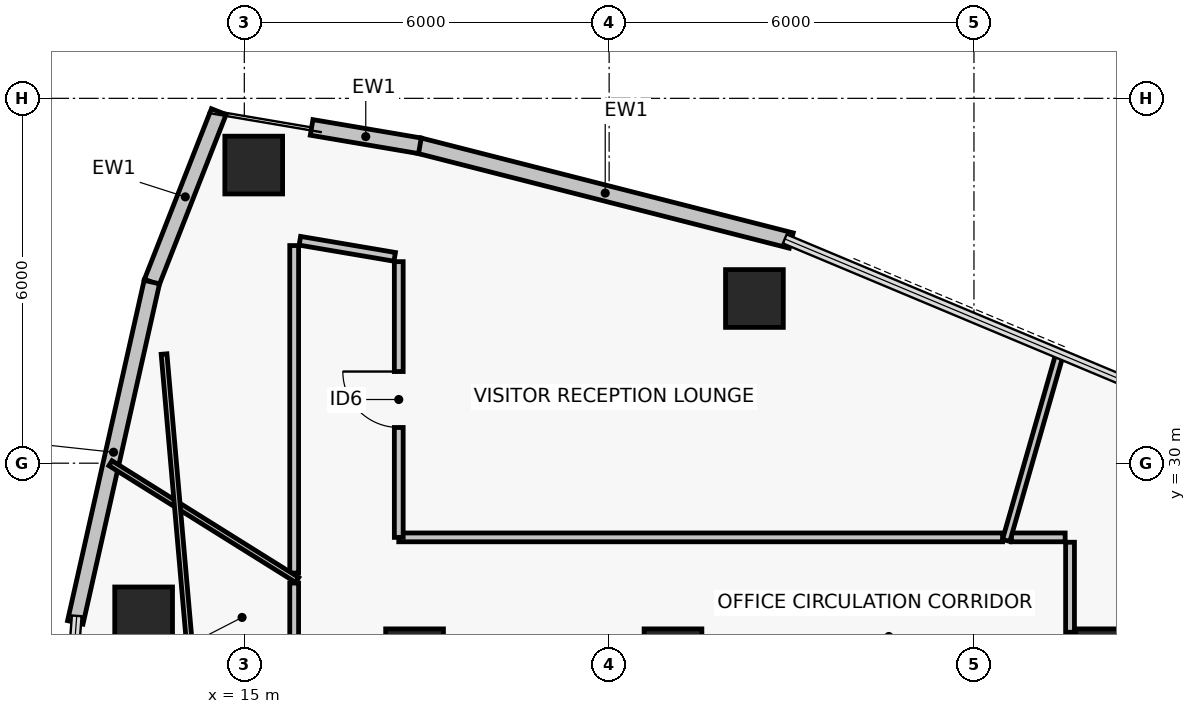
"""IFC4 building model, lengths in metres.
Left out: names, types, materials, properties, quantities, classifications, styles, units other than length and angle.
Written with IfcOpenShell. Run it as: python <this file> out.ifc"""

import sys

from ifc_helpers import new_model, si_unit, direction, frame, frame_2d, origin, origin_2d, place, context, subcontext, project, spatial, rectangle, hollow_rectangle, extrude, element, fill, save


model = new_model("IFC4")
c1 = context("Model", 3, precision=1e-05, world=origin(), true_north=direction((0.0, 1.0)))
c2 = subcontext(c1, "Body", "Model", "MODEL_VIEW")
j1 = project(units=[si_unit("LENGTHUNIT", "METRE"), si_unit("PLANEANGLEUNIT", "RADIAN")], contexts=[c1])
p1 = place(None, origin())
s1 = spatial("IfcSite", under=j1, at=p1, CompositionType="ELEMENT")
p2 = place(p1, origin())
s2 = spatial("IfcBuilding", under=s1, at=p2, CompositionType="ELEMENT")
p3 = place(p2, frame((0.0, 0.0, 210.12)))
s3 = spatial("IfcBuildingStorey", under=s2, at=p3, CompositionType="ELEMENT", Elevation=210.12)
for number, where, z_axis, x_axis in (
    (1, (17.8, 26.8, 0.0), (0.0, 0.0, 1.0), (1.0, 0.0, 0.0)),
    (2, (22.05, 26.8, 0.0), (0.0, 0.0, 1.0), (1.0, 0.0, 0.0)),
    (3, (29.15, 26.8, 0.0), (0.0, 0.0, 1.0), (1.0, 0.0, 0.0)),
):
    element("IfcColumn", number, at=place(p3, frame(where, z_axis=z_axis, x_axis=x_axis)), inside=s3, PredefinedType="COLUMN", context=c2, shape_type="SweptSolid", body=[
        extrude(rectangle(XDim=0.95, YDim=0.95, at=origin_2d()), origin(), (0.0, 0.0, 1.0), 3.72),
    ])
for number, where, z_axis, x_axis in (
    (4, (23.389, 32.708, 0.0), (0.0, 0.0, 1.0), (1.0, 0.0, 0.0)),
    (5, (15.155, 34.903, 0.0), (0.0, 0.0, 1.0), (1.0, 0.0, 0.0)),
    (6, (13.344, 27.489, 0.0), (0.0, 0.0, 1.0), (1.0, 0.0, 0.0)),
):
    element("IfcColumn", number, at=place(p3, frame(where, z_axis=z_axis, x_axis=x_axis)), inside=s3, PredefinedType="COLUMN", context=c2, shape_type="SweptSolid", body=[
        extrude(hollow_rectangle(XDim=0.95, YDim=0.95, WallThickness=0.04, at=origin_2d()), origin(), (0.0, 0.0, 1.0), 3.72),
    ])
p4 = place(p3, frame((17.876, 35.222, 0.0), z_axis=(0.0, 0.0, 1.0), x_axis=(0.968976240439, -0.247153890246, 0.0)))
e7 = element("IfcWall", 7, at=p4, inside=s3, PredefinedType="PARTITIONING", context=c2, shape_type="SweptSolid", body=[
    extrude(rectangle(XDim=6.315, YDim=0.26, at=frame_2d((3.157, 0.0))), origin(), (0.0, 0.0, 1.0), 3.38),
])
p5 = place(p3, frame((16.107, 35.522, 0.0), z_axis=(0.0, 0.0, 1.0), x_axis=(0.985877723898, -0.167466753484, 0.0)))
e8 = element("IfcWall", 8, at=p5, inside=s3, PredefinedType="PARTITIONING", context=c2, shape_type="SweptSolid", body=[
    extrude(rectangle(XDim=1.806, YDim=0.26, at=frame_2d((0.903, 0.0))), origin(), (0.0, 0.0, 1.0), 3.38),
])
p6 = place(p3, frame((13.479, 32.979, 0.0), z_axis=(0.0, 0.0, 1.0), x_axis=(0.365609724313, 0.930768246927, 0.0)))
e9 = element("IfcWall", 9, at=p6, inside=s3, PredefinedType="PARTITIONING", context=c2, shape_type="SweptSolid", body=[
    extrude(rectangle(XDim=3.011, YDim=0.26, at=frame_2d((1.505, 0.0))), origin(), (0.0, 0.0, 1.0), 3.38),
])
p7 = place(p3, frame((12.22, 27.382, 0.0), z_axis=(0.0, 0.0, 1.0), x_axis=(0.219475737697, 0.975617958303, 0.0)))
e10 = element("IfcWall", 10, at=p7, inside=s3, PredefinedType="PARTITIONING", context=c2, shape_type="SweptSolid", body=[
    extrude(rectangle(XDim=5.737, YDim=0.26, at=frame_2d((2.868, 0.0))), origin(), (0.0, 0.0, 1.0), 3.38),
])
p8 = place(p3, frame((28.58, 27.22, 0.0), z_axis=(0.0, 0.0, 1.0), x_axis=(0.0, 1.0, 0.0)))
e11 = element("IfcWall", 11, at=p8, inside=s3, PredefinedType="PARTITIONING", context=c2, shape_type="SweptSolid", body=[
    extrude(rectangle(XDim=1.48, YDim=0.145, at=frame_2d((0.74, 0.0))), origin(), (0.0, 0.0, 1.0), 2.51),
])
p9 = place(p3, frame((28.5, 28.78, 0.0), z_axis=(0.0, 0.0, 1.0), x_axis=(-1.0, 0.0, 0.0)))
e12 = element("IfcWall", 12, at=p9, inside=s3, PredefinedType="PARTITIONING", context=c2, shape_type="SweptSolid", body=[
    extrude(rectangle(XDim=0.883, YDim=0.145, at=frame_2d((0.441, 0.0))), origin(), (0.0, 0.0, 1.0), 3.38),
])
p10 = place(p3, frame((27.471, 28.78, 0.0), z_axis=(0.0, 0.0, 1.0), x_axis=(-1.0, 0.0, 0.0)))
e13 = element("IfcWall", 13, at=p10, inside=s3, PredefinedType="PARTITIONING", context=c2, shape_type="SweptSolid", body=[
    extrude(rectangle(XDim=9.931, YDim=0.145, at=frame_2d((4.966, 0.0))), origin(), (0.0, 0.0, 1.0), 2.61),
])
p11 = place(p3, frame((17.54, 28.78, 0.0), z_axis=(0.0, 0.0, 1.0), x_axis=(0.0, 1.0, 0.0)))
e14 = element("IfcWall", 14, at=p11, inside=s3, PredefinedType="PARTITIONING", context=c2, shape_type="SweptSolid", body=[
    extrude(rectangle(XDim=4.534, YDim=0.145, at=frame_2d((2.267, 0.0))), origin(), (0.0, 0.0, 1.0), 3.01),
])
p12 = place(p11, frame((1.807, 0.0, 0.0)))
e15 = element("IfcOpeningElement", 15, at=p12, cuts=e14, PredefinedType="OPENING", context=c2, shape_type="SweptSolid", body=[
    extrude(rectangle(XDim=0.92, YDim=2.05, at=frame_2d((0.46, 1.025))), frame((0.0, 0.083, 0.0), z_axis=(0.0, -1.0, 0.0), x_axis=(1.0, 0.0, 0.0)), (0.0, 0.0, 1.0), 0.165),
])
p13 = place(p3, frame((17.473, 33.393, 0.0), z_axis=(0.0, 0.0, 1.0), x_axis=(-0.985914419316, 0.167250583809, 0.0)))
e16 = element("IfcWall", 16, at=p13, inside=s3, PredefinedType="PARTITIONING", context=c2, shape_type="SweptSolid", body=[
    extrude(rectangle(XDim=1.582, YDim=0.145, at=frame_2d((0.791, 0.0))), origin(), (0.0, 0.0, 1.0), 3.38),
])
p14 = place(p3, frame((15.82, 33.579, 0.0), z_axis=(0.0, 0.0, 1.0), x_axis=(0.0, -1.0, 0.0)))
e17 = element("IfcWall", 17, at=p14, inside=s3, PredefinedType="PARTITIONING", context=c2, shape_type="SweptSolid", body=[
    extrude(rectangle(XDim=5.385, YDim=0.145, at=frame_2d((2.693, 0.0))), origin(), (0.0, 0.0, 1.0), 2.61),
])
p15 = place(p3, frame((15.82, 28.029, 0.0), z_axis=(0.0, 0.0, 1.0), x_axis=(0.0, -1.0, 0.0)))
e18 = element("IfcWall", 18, at=p15, inside=s3, PredefinedType="PARTITIONING", context=c2, shape_type="SweptSolid", body=[
    extrude(rectangle(XDim=14.741, YDim=0.145, at=frame_2d((7.37, 0.0))), origin(), (0.0, 0.0, 1.0), 2.61),
])
p16 = place(p15, frame((5.241, 0.0, 0.0)))
e19 = element("IfcOpeningElement", 19, at=p16, cuts=e18, PredefinedType="OPENING", context=c2, shape_type="SweptSolid", body=[
    extrude(rectangle(XDim=0.95, YDim=2.06, at=frame_2d((0.475, 1.03))), frame((0.0, 0.083, 0.0), z_axis=(0.0, -1.0, 0.0), x_axis=(1.0, 0.0, 0.0)), (0.0, 0.0, 1.0), 0.165),
])
p17 = place(p3, frame((27.53, 28.73, 0.0), z_axis=(0.0, 0.0, 1.0), x_axis=(0.275627571295, 0.961264501551, 0.0)))
e20 = element("IfcWall", 20, at=p17, inside=s3, PredefinedType="PARTITIONING", context=c2, shape_type="SweptSolid", body=[
    extrude(rectangle(XDim=3.201, YDim=0.125, at=frame_2d((1.601, 0.0))), origin(), (0.0, 0.0, 1.0), 2.81),
])
p18 = place(p3, frame((15.87, 28.08, 0.0), z_axis=(0.0, 0.0, 1.0), x_axis=(-0.848062676376, 0.529895930291, 0.0)))
e21 = element("IfcWall", 21, at=p18, inside=s3, PredefinedType="PARTITIONING", context=c2, shape_type="SweptSolid", body=[
    extrude(rectangle(XDim=3.622, YDim=0.095, at=frame_2d((1.811, 0.0))), origin(), (0.0, 0.0, 1.0), 2.81),
])
p19 = place(p3, frame((13.68, 31.795, 0.0), z_axis=(0.0, 0.0, 1.0), x_axis=(0.087160919272, -0.996194245191, 0.0)))
e22 = element("IfcWall", 22, at=p19, inside=s3, PredefinedType="PARTITIONING", context=c2, shape_type="SweptSolid", body=[
    extrude(rectangle(XDim=21.593, YDim=0.095, at=frame_2d((10.797, 0.0))), origin(), (0.0, 0.0, 1.0), 2.61),
])
p20 = place(p19, frame((10.336, 0.0, 0.0)))
e23 = element("IfcOpeningElement", 23, at=p20, cuts=e22, PredefinedType="OPENING", context=c2, shape_type="SweptSolid", body=[
    extrude(rectangle(XDim=0.92, YDim=2.05, at=frame_2d((0.46, 1.025))), frame((0.0, 0.057, 0.0), z_axis=(0.0, -1.0, 0.0), x_axis=(1.0, 0.0, 0.0)), (0.0, 0.0, 1.0), 0.115),
])
p21 = place(p12, origin())
e24 = element("IfcDoor", 24, at=p21, inside=s3, OperationType="SINGLE_SWING_RIGHT", PredefinedType="DOOR", context=c2, shape_type="SweptSolid", body=[
    extrude(rectangle(XDim=0.92, YDim=2.05, at=frame_2d((0.46, 1.025))), frame((0.0, 0.025, 0.0), z_axis=(0.0, -1.0, 0.0), x_axis=(1.0, 0.0, 0.0)), (0.0, 0.0, 1.0), 0.05),
])
fill(e15, e24)
save(model, sys.argv[1])
